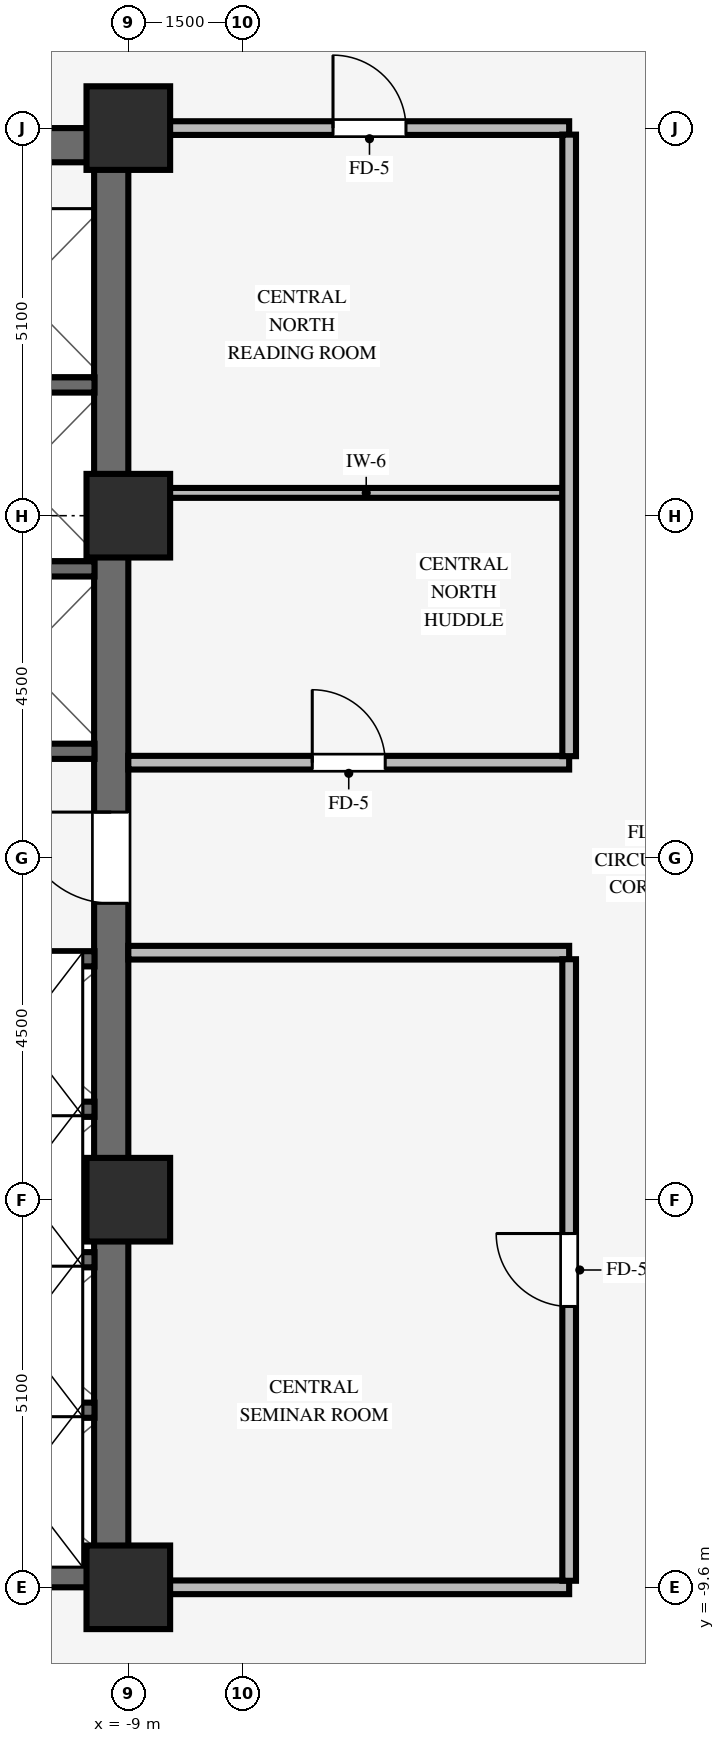
"""IFC4 building model, lengths in metres.
Left out: names, types, materials, properties, quantities, classifications, styles, units other than length and angle.
Written with IfcOpenShell. Run it as: python <this file> out.ifc"""

import sys

from ifc_helpers import new_model, si_unit, direction, frame, frame_2d, origin, origin_2d, place, context, subcontext, project, spatial, rectangle, extrude, source, transform, mapped, element, fill, save


model = new_model("IFC4")
c1 = context("Model", 3, precision=1e-05, world=origin(), true_north=direction((0.0, 1.0)))
c2 = subcontext(c1, "Body", "Model", "MODEL_VIEW")
j1 = project(units=[si_unit("LENGTHUNIT", "METRE"), si_unit("PLANEANGLEUNIT", "RADIAN")], contexts=[c1])
p1 = place(None, origin())
s1 = spatial("IfcSite", under=j1, at=p1, CompositionType="ELEMENT")
p2 = place(p1, origin())
s2 = spatial("IfcBuilding", under=s1, at=p2, CompositionType="ELEMENT")
p3 = place(p2, frame((0.0, 0.0, 75.05)))
s3 = spatial("IfcBuildingStorey", under=s2, at=p3, CompositionType="ELEMENT", Elevation=75.05)
for number, where, z_axis, x_axis in (
    (1, (-17.5, -9.375, 0.0), (0.0, 0.0, 1.0), (1.0, 0.0, 0.0)),
    (2, (-17.5, 9.375, 0.0), (0.0, 0.0, 1.0), (1.0, 0.0, 0.0)),
):
    element("IfcWall", number, at=place(p3, frame(where, z_axis=z_axis, x_axis=x_axis)), inside=s3, PredefinedType="SHEAR", context=c2, shape_type="SweptSolid", body=[
        extrude(rectangle(XDim=8.5, YDim=0.45, at=frame_2d((4.25, 0.0))), origin(), (0.0, 0.0, 1.0), 3.37),
    ])
p4 = place(p3, frame((-9.225, -9.155, 0.0), z_axis=(0.0, 0.0, 1.0), x_axis=(0.0, 1.0, 0.0)))
e3 = element("IfcWall", 3, at=p4, inside=s3, PredefinedType="SHEAR", context=c2, shape_type="SweptSolid", body=[
    extrude(rectangle(XDim=18.31, YDim=0.45, at=frame_2d((9.155, 0.0))), origin(), (0.0, 0.0, 1.0), 3.37),
])
p5 = place(p4, frame((8.555, 0.0, 0.0)))
e4 = element("IfcOpeningElement", 4, at=p5, cuts=e3, PredefinedType="OPENING", context=c2, shape_type="SweptSolid", body=[
    extrude(rectangle(XDim=1.2, YDim=2.15, at=frame_2d((0.6, 1.075))), frame((0.0, 0.235, 0.0), z_axis=(0.0, -1.0, 0.0), x_axis=(1.0, 0.0, 0.0)), (0.0, 0.0, 1.0), 0.47),
])
for number, where, z_axis, x_axis in (
    (5, (-9.0, -9.6, 0.0), (0.0, 0.0, 1.0), (1.0, 0.0, 0.0)),
    (6, (-9.0, -4.5, 0.0), (0.0, 0.0, 1.0), (1.0, 0.0, 0.0)),
    (7, (-9.0, 4.5, 0.0), (0.0, 0.0, 1.0), (1.0, 0.0, 0.0)),
    (8, (-9.0, 9.6, 0.0), (0.0, 0.0, 1.0), (1.0, 0.0, 0.0)),
):
    element("IfcColumn", number, at=place(p3, frame(where, z_axis=z_axis, x_axis=x_axis)), inside=s3, PredefinedType="COLUMN", context=c2, shape_type="SweptSolid", body=[
        extrude(rectangle(XDim=1.1, YDim=1.1, at=origin_2d()), origin(), (0.0, 0.0, 1.0), 3.37),
    ])
for number, where, z_axis, x_axis in (
    (9, (-11.505, -7.27, 0.0), (0.0, 0.0, 1.0), (1.0, 0.0, 0.0)),
    (10, (-11.505, -5.29, 0.0), (0.0, 0.0, 1.0), (1.0, 0.0, 0.0)),
    (11, (-11.505, -3.31, 0.0), (0.0, 0.0, 1.0), (1.0, 0.0, 0.0)),
    (12, (-11.505, -1.33, 0.0), (0.0, 0.0, 1.0), (1.0, 0.0, 0.0)),
    (13, (-11.505, 1.4, 0.0), (0.0, 0.0, 1.0), (1.0, 0.0, 0.0)),
    (14, (-11.505, 3.8, 0.0), (0.0, 0.0, 1.0), (1.0, 0.0, 0.0)),
    (15, (-11.505, 6.22, 0.0), (0.0, 0.0, 1.0), (1.0, 0.0, 0.0)),
):
    element("IfcWall", number, at=place(p3, frame(where, z_axis=z_axis, x_axis=x_axis)), inside=s3, PredefinedType="SHEAR", context=c2, shape_type="SweptSolid", body=[
        extrude(rectangle(XDim=2.06, YDim=0.2, at=frame_2d((1.03, 0.0))), origin(), (0.0, 0.0, 1.0), 3.37),
    ])
p6 = place(p3, frame((-8.454, -9.6, 0.0), z_axis=(0.0, 0.0, 1.0), x_axis=(1.0, 0.0, 0.0)))
e16 = element("IfcWall", 16, at=p6, inside=s3, PredefinedType="PARTITIONING", context=c2, shape_type="SweptSolid", body=[
    extrude(rectangle(XDim=5.254, YDim=0.18, at=frame_2d((2.627, 0.0))), origin(), (0.0, 0.0, 1.0), 2.405),
])
p7 = place(p3, frame((-9.0, -1.25, 0.0), z_axis=(0.0, 0.0, 1.0), x_axis=(1.0, 0.0, 0.0)))
e17 = element("IfcWall", 17, at=p7, inside=s3, PredefinedType="PARTITIONING", context=c2, shape_type="SweptSolid", body=[
    extrude(rectangle(XDim=5.8, YDim=0.18, at=frame_2d((2.9, 0.0))), origin(), (0.0, 0.0, 1.0), 3.36),
])
p8 = place(p3, frame((-9.0, 1.25, 0.0), z_axis=(0.0, 0.0, 1.0), x_axis=(1.0, 0.0, 0.0)))
e18 = element("IfcWall", 18, at=p8, inside=s3, PredefinedType="PARTITIONING", context=c2, shape_type="SweptSolid", body=[
    extrude(rectangle(XDim=5.8, YDim=0.18, at=frame_2d((2.9, 0.0))), origin(), (0.0, 0.0, 1.0), 3.36),
])
p9 = place(p8, frame((2.42, 0.0, 0.0)))
e19 = element("IfcOpeningElement", 19, at=p9, cuts=e18, PredefinedType="OPENING", context=c2, shape_type="SweptSolid", body=[
    extrude(rectangle(XDim=0.96, YDim=2.1, at=frame_2d((0.48, 1.05))), frame((0.0, 0.1, 0.0), z_axis=(0.0, -1.0, 0.0), x_axis=(1.0, 0.0, 0.0)), (0.0, 0.0, 1.0), 0.2),
])
p10 = place(p3, frame((-8.454, 4.8, 0.0), z_axis=(0.0, 0.0, 1.0), x_axis=(1.0, 0.0, 0.0)))
e20 = element("IfcWall", 20, at=p10, inside=s3, PredefinedType="PARTITIONING", context=c2, shape_type="SweptSolid", body=[
    extrude(rectangle(XDim=5.168, YDim=0.13, at=frame_2d((2.584, 0.0))), origin(), (0.0, 0.0, 1.0), 2.738),
])
p11 = place(p3, frame((-8.454, 9.6, 0.0), z_axis=(0.0, 0.0, 1.0), x_axis=(1.0, 0.0, 0.0)))
e21 = element("IfcWall", 21, at=p11, inside=s3, PredefinedType="PARTITIONING", context=c2, shape_type="SweptSolid", body=[
    extrude(rectangle(XDim=5.254, YDim=0.18, at=frame_2d((2.627, 0.0))), origin(), (0.0, 0.0, 1.0), 2.405),
])
p12 = place(p11, frame((2.147, 0.0, 0.0)))
e22 = element("IfcOpeningElement", 22, at=p12, cuts=e21, PredefinedType="OPENING", context=c2, shape_type="SweptSolid", body=[
    extrude(rectangle(XDim=0.96, YDim=2.1, at=frame_2d((0.48, 1.05))), frame((0.0, 0.1, 0.0), z_axis=(0.0, -1.0, 0.0), x_axis=(1.0, 0.0, 0.0)), (0.0, 0.0, 1.0), 0.2),
])
p13 = place(p3, frame((-3.2, -9.514, 0.0), z_axis=(0.0, 0.0, 1.0), x_axis=(0.0, 1.0, 0.0)))
e23 = element("IfcWall", 23, at=p13, inside=s3, PredefinedType="PARTITIONING", context=c2, shape_type="SweptSolid", body=[
    extrude(rectangle(XDim=8.178, YDim=0.18, at=frame_2d((4.089, 0.0))), origin(), (0.0, 0.0, 1.0), 3.36),
])
p14 = place(p13, frame((3.609, 0.0, 0.0)))
e24 = element("IfcOpeningElement", 24, at=p14, cuts=e23, PredefinedType="OPENING", context=c2, shape_type="SweptSolid", body=[
    extrude(rectangle(XDim=0.96, YDim=2.1, at=frame_2d((0.48, 1.05))), frame((0.0, 0.1, 0.0), z_axis=(0.0, -1.0, 0.0), x_axis=(1.0, 0.0, 0.0)), (0.0, 0.0, 1.0), 0.2),
])
p15 = place(p3, frame((-3.2, 1.336, 0.0), z_axis=(0.0, 0.0, 1.0), x_axis=(0.0, 1.0, 0.0)))
e25 = element("IfcWall", 25, at=p15, inside=s3, PredefinedType="PARTITIONING", context=c2, shape_type="SweptSolid", body=[
    extrude(rectangle(XDim=8.178, YDim=0.18, at=frame_2d((4.089, 0.0))), origin(), (0.0, 0.0, 1.0), 3.36),
])
m1 = source(origin(), c2, "Body", "SweptSolid", [
    extrude(rectangle(XDim=1.2, YDim=2.15, at=frame_2d((0.6, 1.075))), frame((0.0, 0.025, 0.0), z_axis=(0.0, -1.0, 0.0), x_axis=(1.0, 0.0, 0.0)), (0.0, 0.0, 1.0), 0.05),
])
p16 = place(p5, origin())
e26 = element("IfcDoor", 26, at=p16, inside=s3, OperationType="SINGLE_SWING_RIGHT", PredefinedType="DOOR", context=c2, shape_type="MappedRepresentation", body=[
    mapped(m1, transform((0.0, 0.0, 0.0), scale=1.0)),
])
fill(e4, e26)
m2 = source(origin(), c2, "Body", "SweptSolid", [
    extrude(rectangle(XDim=0.96, YDim=2.1, at=frame_2d((0.48, 1.05))), frame((0.0, 0.025, 0.0), z_axis=(0.0, -1.0, 0.0), x_axis=(1.0, 0.0, 0.0)), (0.0, 0.0, 1.0), 0.05),
])
p17 = place(p14, origin())
e27 = element("IfcDoor", 27, at=p17, inside=s3, OperationType="SINGLE_SWING_RIGHT", PredefinedType="DOOR", context=c2, shape_type="MappedRepresentation", body=[
    mapped(m2, transform((0.0, 0.0, 0.0), scale=1.0)),
])
fill(e24, e27)
p18 = place(p9, origin())
e28 = element("IfcDoor", 28, at=p18, inside=s3, OperationType="SINGLE_SWING_LEFT", PredefinedType="DOOR", context=c2, shape_type="MappedRepresentation", body=[
    mapped(m2, transform((0.0, 0.0, 0.0), scale=1.0)),
])
fill(e19, e28)
p19 = place(p12, origin())
e29 = element("IfcDoor", 29, at=p19, inside=s3, OperationType="SINGLE_SWING_LEFT", PredefinedType="DOOR", context=c2, shape_type="MappedRepresentation", body=[
    mapped(m2, transform((0.0, 0.0, 0.0), scale=1.0)),
])
fill(e22, e29)
save(model, sys.argv[1])
